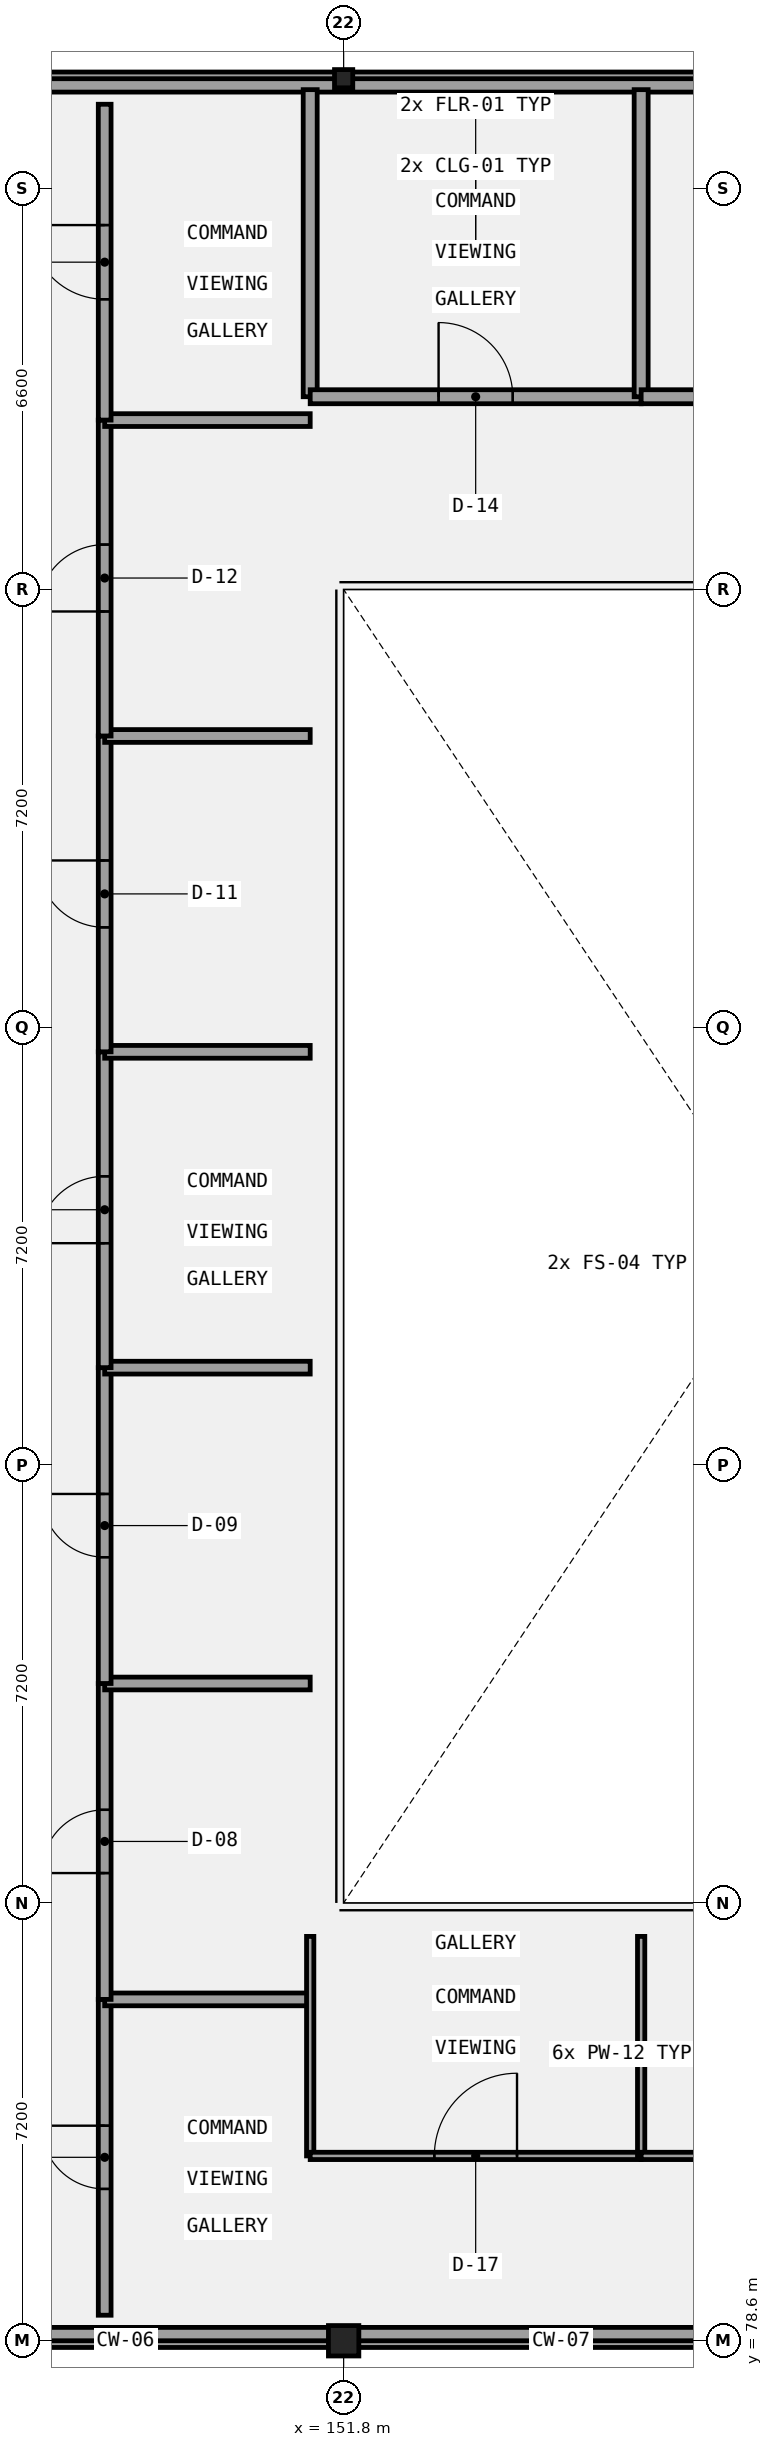
"""IFC4 building model, lengths in metres.
Left out: names, types, materials, properties, quantities, classifications, styles, units other than length and angle.
Written with IfcOpenShell. Run it as: python <this file> out.ifc"""

import sys

from ifc_helpers import new_model, si_unit, direction, frame, frame_2d, origin, origin_2d, place, context, subcontext, project, spatial, rectangle, i_section, extrude, element, fill, save


model = new_model("IFC4")
c1 = context("Model", 3, precision=1e-05, world=origin(), true_north=direction((0.0, 1.0)))
c2 = subcontext(c1, "Body", "Model", "MODEL_VIEW")
j1 = project(units=[si_unit("LENGTHUNIT", "METRE"), si_unit("PLANEANGLEUNIT", "RADIAN")], contexts=[c1])
p1 = place(None, origin())
s1 = spatial("IfcSite", under=j1, at=p1, CompositionType="ELEMENT")
p2 = place(p1, origin())
s2 = spatial("IfcBuilding", under=s1, at=p2, CompositionType="ELEMENT")
p3 = place(p2, frame((0.0, 0.0, 30.9)))
s3 = spatial("IfcBuildingStorey", under=s2, at=p3, CompositionType="ELEMENT", Elevation=30.9)
p4 = place(p3, frame((151.8, 78.6, 0.0), z_axis=(0.0, 0.0, 1.0), x_axis=(1.0, 0.0, 0.0)))
e1 = element("IfcColumn", 1, at=p4, inside=s3, PredefinedType="COLUMN", context=c2, shape_type="SweptSolid", body=[
    extrude(rectangle(XDim=0.5, YDim=0.5, at=origin_2d()), origin(), (0.0, 0.0, 1.0), 4.5),
])
p5 = place(p3, frame((151.8, 115.8, 0.0), z_axis=(0.0, 0.0, 1.0), x_axis=(1.0, 0.0, 0.0)))
e2 = element("IfcColumn", 2, at=p5, inside=s3, PredefinedType="COLUMN", context=c2, shape_type="SweptSolid", body=[
    extrude(i_section(OverallWidth=0.3, OverallDepth=0.3, WebThickness=0.011, FlangeThickness=0.019, FilletRadius=0.027, at=origin_2d()), origin(), (0.0, 0.0, 1.0), 4.5),
])
for number, where, z_axis, x_axis in (
    (3, (144.45, 78.6, 0.0), (0.0, 0.0, 1.0), (1.0, 0.0, 0.0)),
    (4, (168.15, 115.8, 0.0), (0.0, 0.0, 1.0), (-1.0, 0.0, 0.0)),
):
    element("IfcWall", number, at=place(p3, frame(where, z_axis=z_axis, x_axis=x_axis)), inside=s3, PredefinedType="PARAPET", context=c2, shape_type="SweptSolid", body=[
        extrude(rectangle(XDim=23.7, YDim=0.22, at=frame_2d((11.85, 0.0))), origin(), (0.0, 0.0, 1.0), 0.45),
    ])
p6 = place(p3, frame((144.71, 115.69, 4.5), z_axis=(0.0, 0.0, 1.0), x_axis=(1.0, 0.0, 0.0)))
e5 = element("IfcWall", 5, at=p6, inside=s3, PredefinedType="PARAPET", context=c2, shape_type="SweptSolid", body=[
    extrude(rectangle(XDim=23.18, YDim=0.22, at=frame_2d((11.59, 0.0))), origin(), (0.0, 0.0, 1.0), 1.12),
])
p7 = place(p3, frame((167.89, 78.71, 4.5), z_axis=(0.0, 0.0, 1.0), x_axis=(-1.0, 0.0, 0.0)))
e6 = element("IfcWall", 6, at=p7, inside=s3, PredefinedType="PARAPET", context=c2, shape_type="SweptSolid", body=[
    extrude(rectangle(XDim=59.18, YDim=0.22, at=frame_2d((29.59, 0.0))), origin(), (0.0, 0.0, 1.0), 1.12),
])
p8 = place(p3, frame((147.87, 79.02, 0.0), z_axis=(0.0, 0.0, 1.0), x_axis=(0.0, 1.0, 0.0)))
e7 = element("IfcWall", 7, at=p8, inside=s3, PredefinedType="PARTITIONING", context=c2, shape_type="SweptSolid", body=[
    extrude(rectangle(XDim=5.194, YDim=0.21, at=frame_2d((2.597, 0.0))), origin(), (0.0, 0.0, 1.0), 4.25),
])
p9 = place(p8, frame((2.077, 0.0, 0.0)))
e8 = element("IfcOpeningElement", 8, at=p9, cuts=e7, PredefinedType="OPENING", context=c2, shape_type="SweptSolid", body=[
    extrude(rectangle(XDim=1.04, YDim=2.1, at=frame_2d((0.52, 1.05))), frame((0.0, 0.115, 0.0), z_axis=(0.0, -1.0, 0.0), x_axis=(1.0, 0.0, 0.0)), (0.0, 0.0, 1.0), 0.23),
])
p10 = place(p3, frame((147.87, 84.214, 0.0), z_axis=(0.0, 0.0, 1.0), x_axis=(1.0, 0.0, 0.0)))
e9 = element("IfcWall", 9, at=p10, inside=s3, PredefinedType="PARTITIONING", context=c2, shape_type="SweptSolid", body=[
    extrude(rectangle(XDim=3.38, YDim=0.21, at=frame_2d((1.69, 0.0))), origin(), (0.0, 0.0, 1.0), 4.25),
])
p11 = place(p3, frame((147.87, 84.214, 0.0), z_axis=(0.0, 0.0, 1.0), x_axis=(0.0, 1.0, 0.0)))
e10 = element("IfcWall", 10, at=p11, inside=s3, PredefinedType="PARTITIONING", context=c2, shape_type="SweptSolid", body=[
    extrude(rectangle(XDim=5.195, YDim=0.21, at=frame_2d((2.597, 0.0))), origin(), (0.0, 0.0, 1.0), 4.25),
])
p12 = place(p11, frame((2.077, 0.0, 0.0)))
e11 = element("IfcOpeningElement", 11, at=p12, cuts=e10, PredefinedType="OPENING", context=c2, shape_type="SweptSolid", body=[
    extrude(rectangle(XDim=1.04, YDim=2.22, at=frame_2d((0.52, 1.11))), frame((0.0, 0.115, 0.0), z_axis=(0.0, -1.0, 0.0), x_axis=(1.0, 0.0, 0.0)), (0.0, 0.0, 1.0), 0.23),
])
p13 = place(p3, frame((147.87, 89.409, 0.0), z_axis=(0.0, 0.0, 1.0), x_axis=(1.0, 0.0, 0.0)))
e12 = element("IfcWall", 12, at=p13, inside=s3, PredefinedType="PARTITIONING", context=c2, shape_type="SweptSolid", body=[
    extrude(rectangle(XDim=3.38, YDim=0.21, at=frame_2d((1.69, 0.0))), origin(), (0.0, 0.0, 1.0), 4.25),
])
p14 = place(p3, frame((147.87, 89.409, 0.0), z_axis=(0.0, 0.0, 1.0), x_axis=(0.0, 1.0, 0.0)))
e13 = element("IfcWall", 13, at=p14, inside=s3, PredefinedType="PARTITIONING", context=c2, shape_type="SweptSolid", body=[
    extrude(rectangle(XDim=5.194, YDim=0.21, at=frame_2d((2.597, 0.0))), origin(), (0.0, 0.0, 1.0), 4.25),
])
p15 = place(p14, frame((2.077, 0.0, 0.0)))
e14 = element("IfcOpeningElement", 14, at=p15, cuts=e13, PredefinedType="OPENING", context=c2, shape_type="SweptSolid", body=[
    extrude(rectangle(XDim=1.04, YDim=2.35, at=frame_2d((0.52, 1.175))), frame((0.0, 0.115, 0.0), z_axis=(0.0, -1.0, 0.0), x_axis=(1.0, 0.0, 0.0)), (0.0, 0.0, 1.0), 0.23),
])
p16 = place(p3, frame((147.87, 94.603, 0.0), z_axis=(0.0, 0.0, 1.0), x_axis=(1.0, 0.0, 0.0)))
e15 = element("IfcWall", 15, at=p16, inside=s3, PredefinedType="PARTITIONING", context=c2, shape_type="SweptSolid", body=[
    extrude(rectangle(XDim=3.38, YDim=0.21, at=frame_2d((1.69, 0.0))), origin(), (0.0, 0.0, 1.0), 4.25),
])
p17 = place(p3, frame((147.87, 94.603, 0.0), z_axis=(0.0, 0.0, 1.0), x_axis=(0.0, 1.0, 0.0)))
e16 = element("IfcWall", 16, at=p17, inside=s3, PredefinedType="PARTITIONING", context=c2, shape_type="SweptSolid", body=[
    extrude(rectangle(XDim=5.194, YDim=0.21, at=frame_2d((2.597, 0.0))), origin(), (0.0, 0.0, 1.0), 4.25),
])
p18 = place(p17, frame((2.047, 0.0, 0.0)))
e17 = element("IfcOpeningElement", 17, at=p18, cuts=e16, PredefinedType="OPENING", context=c2, shape_type="SweptSolid", body=[
    extrude(rectangle(XDim=1.1, YDim=2.1, at=frame_2d((0.55, 1.05))), frame((0.0, 0.115, 0.0), z_axis=(0.0, -1.0, 0.0), x_axis=(1.0, 0.0, 0.0)), (0.0, 0.0, 1.0), 0.23),
])
p19 = place(p3, frame((147.87, 99.797, 0.0), z_axis=(0.0, 0.0, 1.0), x_axis=(1.0, 0.0, 0.0)))
e18 = element("IfcWall", 18, at=p19, inside=s3, PredefinedType="PARTITIONING", context=c2, shape_type="SweptSolid", body=[
    extrude(rectangle(XDim=3.38, YDim=0.21, at=frame_2d((1.69, 0.0))), origin(), (0.0, 0.0, 1.0), 4.25),
])
p20 = place(p3, frame((147.87, 99.797, 0.0), z_axis=(0.0, 0.0, 1.0), x_axis=(0.0, 1.0, 0.0)))
e19 = element("IfcWall", 19, at=p20, inside=s3, PredefinedType="PARTITIONING", context=c2, shape_type="SweptSolid", body=[
    extrude(rectangle(XDim=5.194, YDim=0.21, at=frame_2d((2.597, 0.0))), origin(), (0.0, 0.0, 1.0), 4.25),
])
p21 = place(p20, frame((2.047, 0.0, 0.0)))
e20 = element("IfcOpeningElement", 20, at=p21, cuts=e19, PredefinedType="OPENING", context=c2, shape_type="SweptSolid", body=[
    extrude(rectangle(XDim=1.1, YDim=2.22, at=frame_2d((0.55, 1.11))), frame((0.0, 0.115, 0.0), z_axis=(0.0, -1.0, 0.0), x_axis=(1.0, 0.0, 0.0)), (0.0, 0.0, 1.0), 0.23),
])
p22 = place(p3, frame((147.87, 104.991, 0.0), z_axis=(0.0, 0.0, 1.0), x_axis=(1.0, 0.0, 0.0)))
e21 = element("IfcWall", 21, at=p22, inside=s3, PredefinedType="PARTITIONING", context=c2, shape_type="SweptSolid", body=[
    extrude(rectangle(XDim=3.38, YDim=0.21, at=frame_2d((1.69, 0.0))), origin(), (0.0, 0.0, 1.0), 4.25),
])
p23 = place(p3, frame((147.87, 104.991, 0.0), z_axis=(0.0, 0.0, 1.0), x_axis=(0.0, 1.0, 0.0)))
e22 = element("IfcWall", 22, at=p23, inside=s3, PredefinedType="PARTITIONING", context=c2, shape_type="SweptSolid", body=[
    extrude(rectangle(XDim=5.195, YDim=0.21, at=frame_2d((2.598, 0.0))), origin(), (0.0, 0.0, 1.0), 4.25),
])
p24 = place(p23, frame((2.048, 0.0, 0.0)))
e23 = element("IfcOpeningElement", 23, at=p24, cuts=e22, PredefinedType="OPENING", context=c2, shape_type="SweptSolid", body=[
    extrude(rectangle(XDim=1.1, YDim=2.35, at=frame_2d((0.55, 1.175))), frame((0.0, 0.115, 0.0), z_axis=(0.0, -1.0, 0.0), x_axis=(1.0, 0.0, 0.0)), (0.0, 0.0, 1.0), 0.23),
])
p25 = place(p3, frame((147.87, 110.186, 0.0), z_axis=(0.0, 0.0, 1.0), x_axis=(1.0, 0.0, 0.0)))
e24 = element("IfcWall", 24, at=p25, inside=s3, PredefinedType="PARTITIONING", context=c2, shape_type="SweptSolid", body=[
    extrude(rectangle(XDim=3.38, YDim=0.21, at=frame_2d((1.69, 0.0))), origin(), (0.0, 0.0, 1.0), 4.25),
])
p26 = place(p3, frame((147.87, 110.186, 0.0), z_axis=(0.0, 0.0, 1.0), x_axis=(0.0, 1.0, 0.0)))
e25 = element("IfcWall", 25, at=p26, inside=s3, PredefinedType="PARTITIONING", context=c2, shape_type="SweptSolid", body=[
    extrude(rectangle(XDim=5.194, YDim=0.21, at=frame_2d((2.597, 0.0))), origin(), (0.0, 0.0, 1.0), 4.25),
])
p27 = place(p26, frame((1.987, 0.0, 0.0)))
e26 = element("IfcOpeningElement", 26, at=p27, cuts=e25, PredefinedType="OPENING", context=c2, shape_type="SweptSolid", body=[
    extrude(rectangle(XDim=1.22, YDim=2.1, at=frame_2d((0.61, 1.05))), frame((0.0, 0.115, 0.0), z_axis=(0.0, -1.0, 0.0), x_axis=(1.0, 0.0, 0.0)), (0.0, 0.0, 1.0), 0.23),
])
p28 = place(p3, frame((151.25, 110.57, 0.0), z_axis=(0.0, 0.0, 1.0), x_axis=(0.0, 1.0, 0.0)))
e27 = element("IfcWall", 27, at=p28, inside=s3, PredefinedType="PARTITIONING", context=c2, shape_type="SweptSolid", body=[
    extrude(rectangle(XDim=5.05, YDim=0.23, at=frame_2d((2.525, 0.0))), origin(), (0.0, 0.0, 1.0), 4.25),
])
p29 = place(p3, frame((151.25, 110.57, 0.0), z_axis=(0.0, 0.0, 1.0), x_axis=(1.0, 0.0, 0.0)))
e28 = element("IfcWall", 28, at=p29, inside=s3, PredefinedType="PARTITIONING", context=c2, shape_type="SweptSolid", body=[
    extrude(rectangle(XDim=5.443, YDim=0.23, at=frame_2d((2.722, 0.0))), origin(), (0.0, 0.0, 1.0), 4.25),
])
p30 = place(p29, frame((2.112, 0.0, 0.0)))
e29 = element("IfcOpeningElement", 29, at=p30, cuts=e28, PredefinedType="OPENING", context=c2, shape_type="SweptSolid", body=[
    extrude(rectangle(XDim=1.22, YDim=2.22, at=frame_2d((0.61, 1.11))), frame((0.0, 0.125, 0.0), z_axis=(0.0, -1.0, 0.0), x_axis=(1.0, 0.0, 0.0)), (0.0, 0.0, 1.0), 0.25),
])
p31 = place(p3, frame((156.693, 110.57, 0.0), z_axis=(0.0, 0.0, 1.0), x_axis=(0.0, 1.0, 0.0)))
e30 = element("IfcWall", 30, at=p31, inside=s3, PredefinedType="PARTITIONING", context=c2, shape_type="SweptSolid", body=[
    extrude(rectangle(XDim=5.05, YDim=0.23, at=frame_2d((2.525, 0.0))), origin(), (0.0, 0.0, 1.0), 4.25),
])
p32 = place(p3, frame((156.693, 110.57, 0.0), z_axis=(0.0, 0.0, 1.0), x_axis=(1.0, 0.0, 0.0)))
e31 = element("IfcWall", 31, at=p32, inside=s3, PredefinedType="PARTITIONING", context=c2, shape_type="SweptSolid", body=[
    extrude(rectangle(XDim=5.444, YDim=0.23, at=frame_2d((2.722, 0.0))), origin(), (0.0, 0.0, 1.0), 4.25),
])
p33 = place(p32, frame((2.112, 0.0, 0.0)))
e32 = element("IfcOpeningElement", 32, at=p33, cuts=e31, PredefinedType="OPENING", context=c2, shape_type="SweptSolid", body=[
    extrude(rectangle(XDim=1.22, YDim=2.35, at=frame_2d((0.61, 1.175))), frame((0.0, 0.125, 0.0), z_axis=(0.0, -1.0, 0.0), x_axis=(1.0, 0.0, 0.0)), (0.0, 0.0, 1.0), 0.25),
])
p34 = place(p3, frame((151.25, 81.64, 0.0), z_axis=(0.0, 0.0, 1.0), x_axis=(0.0, 1.0, 0.0)))
e33 = element("IfcWall", 33, at=p34, inside=s3, PredefinedType="PARTITIONING", context=c2, shape_type="SweptSolid", body=[
    extrude(rectangle(XDim=3.61, YDim=0.12, at=frame_2d((1.805, 0.0))), origin(), (0.0, 0.0, 1.0), 4.25),
])
p35 = place(p3, frame((151.25, 81.64, 0.0), z_axis=(0.0, 0.0, 1.0), x_axis=(1.0, 0.0, 0.0)))
e34 = element("IfcWall", 34, at=p35, inside=s3, PredefinedType="PARTITIONING", context=c2, shape_type="SweptSolid", body=[
    extrude(rectangle(XDim=5.443, YDim=0.12, at=frame_2d((2.722, 0.0))), origin(), (0.0, 0.0, 1.0), 4.25),
])
p36 = place(p35, frame((2.042, 0.0, 0.0)))
e35 = element("IfcOpeningElement", 35, at=p36, cuts=e34, PredefinedType="OPENING", context=c2, shape_type="SweptSolid", body=[
    extrude(rectangle(XDim=1.36, YDim=2.22, at=frame_2d((0.68, 1.11))), frame((0.0, 0.07, 0.0), z_axis=(0.0, -1.0, 0.0), x_axis=(1.0, 0.0, 0.0)), (0.0, 0.0, 1.0), 0.14),
])
p37 = place(p3, frame((156.693, 81.64, 0.0), z_axis=(0.0, 0.0, 1.0), x_axis=(0.0, 1.0, 0.0)))
e36 = element("IfcWall", 36, at=p37, inside=s3, PredefinedType="PARTITIONING", context=c2, shape_type="SweptSolid", body=[
    extrude(rectangle(XDim=3.61, YDim=0.12, at=frame_2d((1.805, 0.0))), origin(), (0.0, 0.0, 1.0), 4.25),
])
p38 = place(p3, frame((156.693, 81.64, 0.0), z_axis=(0.0, 0.0, 1.0), x_axis=(1.0, 0.0, 0.0)))
e37 = element("IfcWall", 37, at=p38, inside=s3, PredefinedType="PARTITIONING", context=c2, shape_type="SweptSolid", body=[
    extrude(rectangle(XDim=5.444, YDim=0.12, at=frame_2d((2.722, 0.0))), origin(), (0.0, 0.0, 1.0), 4.25),
])
p39 = place(p38, frame((2.042, 0.0, 0.0)))
e38 = element("IfcOpeningElement", 38, at=p39, cuts=e37, PredefinedType="OPENING", context=c2, shape_type="SweptSolid", body=[
    extrude(rectangle(XDim=1.36, YDim=2.35, at=frame_2d((0.68, 1.175))), frame((0.0, 0.07, 0.0), z_axis=(0.0, -1.0, 0.0), x_axis=(1.0, 0.0, 0.0)), (0.0, 0.0, 1.0), 0.14),
])
p40 = place(p9, origin())
e39 = element("IfcDoor", 39, at=p40, inside=s3, OperationType="SINGLE_SWING_RIGHT", PredefinedType="DOOR", context=c2, shape_type="SweptSolid", body=[
    extrude(rectangle(XDim=1.04, YDim=2.1, at=frame_2d((0.52, 1.05))), frame((0.0, 0.025, 0.0), z_axis=(0.0, -1.0, 0.0), x_axis=(1.0, 0.0, 0.0)), (0.0, 0.0, 1.0), 0.05),
])
fill(e8, e39)
p41 = place(p12, origin())
e40 = element("IfcDoor", 40, at=p41, inside=s3, OperationType="SINGLE_SWING_LEFT", PredefinedType="DOOR", context=c2, shape_type="SweptSolid", body=[
    extrude(rectangle(XDim=1.04, YDim=2.22, at=frame_2d((0.52, 1.11))), frame((0.0, 0.025, 0.0), z_axis=(0.0, -1.0, 0.0), x_axis=(1.0, 0.0, 0.0)), (0.0, 0.0, 1.0), 0.05),
])
fill(e11, e40)
p42 = place(p15, origin())
e41 = element("IfcDoor", 41, at=p42, inside=s3, OperationType="SINGLE_SWING_RIGHT", PredefinedType="DOOR", context=c2, shape_type="SweptSolid", body=[
    extrude(rectangle(XDim=1.04, YDim=2.35, at=frame_2d((0.52, 1.175))), frame((0.0, 0.025, 0.0), z_axis=(0.0, -1.0, 0.0), x_axis=(1.0, 0.0, 0.0)), (0.0, 0.0, 1.0), 0.05),
])
fill(e14, e41)
p43 = place(p18, origin())
e42 = element("IfcDoor", 42, at=p43, inside=s3, OperationType="SINGLE_SWING_LEFT", PredefinedType="DOOR", context=c2, shape_type="SweptSolid", body=[
    extrude(rectangle(XDim=1.1, YDim=2.1, at=frame_2d((0.55, 1.05))), frame((0.0, 0.025, 0.0), z_axis=(0.0, -1.0, 0.0), x_axis=(1.0, 0.0, 0.0)), (0.0, 0.0, 1.0), 0.05),
])
fill(e17, e42)
p44 = place(p21, origin())
e43 = element("IfcDoor", 43, at=p44, inside=s3, OperationType="SINGLE_SWING_RIGHT", PredefinedType="DOOR", context=c2, shape_type="SweptSolid", body=[
    extrude(rectangle(XDim=1.1, YDim=2.22, at=frame_2d((0.55, 1.11))), frame((0.0, 0.025, 0.0), z_axis=(0.0, -1.0, 0.0), x_axis=(1.0, 0.0, 0.0)), (0.0, 0.0, 1.0), 0.05),
])
fill(e20, e43)
p45 = place(p24, origin())
e44 = element("IfcDoor", 44, at=p45, inside=s3, OperationType="SINGLE_SWING_LEFT", PredefinedType="DOOR", context=c2, shape_type="SweptSolid", body=[
    extrude(rectangle(XDim=1.1, YDim=2.35, at=frame_2d((0.55, 1.175))), frame((0.0, 0.025, 0.0), z_axis=(0.0, -1.0, 0.0), x_axis=(1.0, 0.0, 0.0)), (0.0, 0.0, 1.0), 0.05),
])
fill(e23, e44)
p46 = place(p27, origin())
e45 = element("IfcDoor", 45, at=p46, inside=s3, OperationType="SINGLE_SWING_RIGHT", PredefinedType="DOOR", context=c2, shape_type="SweptSolid", body=[
    extrude(rectangle(XDim=1.22, YDim=2.1, at=frame_2d((0.61, 1.05))), frame((0.0, 0.025, 0.0), z_axis=(0.0, -1.0, 0.0), x_axis=(1.0, 0.0, 0.0)), (0.0, 0.0, 1.0), 0.05),
])
fill(e26, e45)
p47 = place(p30, origin())
e46 = element("IfcDoor", 46, at=p47, inside=s3, OperationType="SINGLE_SWING_LEFT", PredefinedType="DOOR", context=c2, shape_type="SweptSolid", body=[
    extrude(rectangle(XDim=1.22, YDim=2.22, at=frame_2d((0.61, 1.11))), frame((0.0, 0.025, 0.0), z_axis=(0.0, -1.0, 0.0), x_axis=(1.0, 0.0, 0.0)), (0.0, 0.0, 1.0), 0.05),
])
fill(e29, e46)
p48 = place(p36, origin())
e47 = element("IfcDoor", 47, at=p48, inside=s3, OperationType="SINGLE_SWING_RIGHT", PredefinedType="DOOR", context=c2, shape_type="SweptSolid", body=[
    extrude(rectangle(XDim=1.36, YDim=2.22, at=frame_2d((0.68, 1.11))), frame((0.0, 0.025, 0.0), z_axis=(0.0, -1.0, 0.0), x_axis=(1.0, 0.0, 0.0)), (0.0, 0.0, 1.0), 0.05),
])
fill(e35, e47)
save(model, sys.argv[1])
